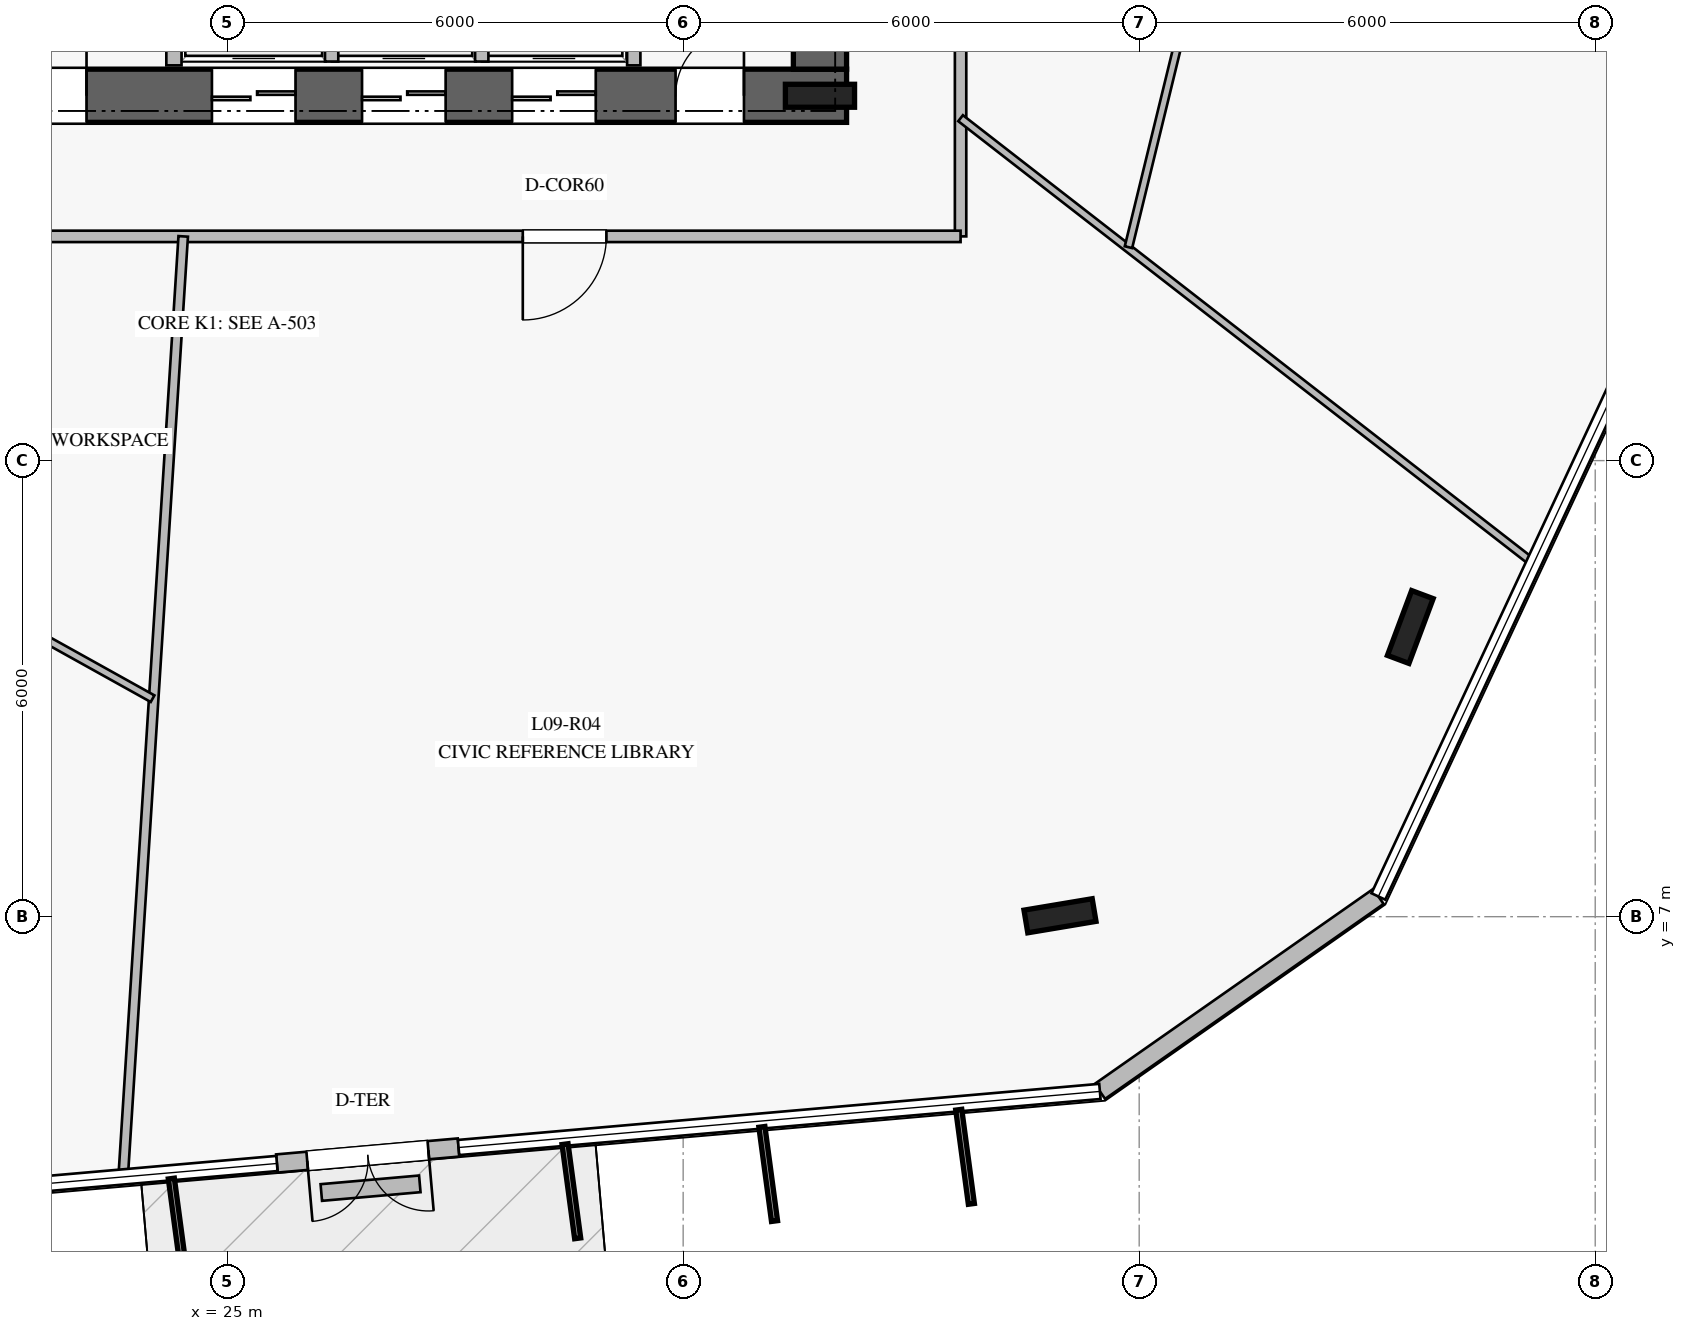
"""IFC4 building model, lengths in metres.
Left out: names, types, materials, properties, quantities, classifications, styles, units other than length and angle.
Written with IfcOpenShell. Run it as: python <this file> out.ifc"""

import sys

from ifc_helpers import new_model, si_unit, direction, frame, frame_2d, origin, origin_2d, place, context, subcontext, project, spatial, rectangle, i_section, extrude, element, fill, save


model = new_model("IFC4")
c1 = context("Model", 3, precision=1e-05, world=origin(), true_north=direction((0.0, 1.0)))
c2 = subcontext(c1, "Body", "Model", "MODEL_VIEW")
j1 = project(units=[si_unit("LENGTHUNIT", "METRE"), si_unit("PLANEANGLEUNIT", "RADIAN")], contexts=[c1])
p1 = place(None, origin())
s1 = spatial("IfcSite", under=j1, at=p1, CompositionType="ELEMENT")
p2 = place(p1, origin())
s2 = spatial("IfcBuilding", under=s1, at=p2, CompositionType="ELEMENT")
p3 = place(p2, frame((0.0, 0.0, 40.0)))
s3 = spatial("IfcBuildingStorey", under=s2, at=p3, CompositionType="ELEMENT", Elevation=40.0)
p4 = place(p3, frame((16.85, 17.8, 0.0), z_axis=(0.0, 0.0, 1.0), x_axis=(1.0, 0.0, 0.0)))
e1 = element("IfcWall", 1, at=p4, inside=s3, PredefinedType="SHEAR", context=c2, shape_type="SweptSolid", body=[
    extrude(rectangle(XDim=16.3, YDim=0.7, at=frame_2d((8.15, 0.0))), origin(), (0.0, 0.0, 1.0), 3.76),
])
p5 = place(p4, frame((5.1, 0.0, 0.0)))
e2 = element("IfcOpeningElement", 2, at=p5, cuts=e1, PredefinedType="OPENING", context=c2, shape_type="SweptSolid", body=[
    extrude(rectangle(XDim=1.2, YDim=2.25, at=frame_2d((0.6, 1.125))), frame((0.0, 0.36, 0.0), z_axis=(0.0, -1.0, 0.0), x_axis=(1.0, 0.0, 0.0)), (0.0, 0.0, 1.0), 0.72),
])
p6 = place(p4, frame((14.05, 0.0, 0.0)))
e3 = element("IfcOpeningElement", 3, at=p6, cuts=e1, PredefinedType="OPENING", context=c2, shape_type="SweptSolid", body=[
    extrude(rectangle(XDim=0.9, YDim=2.1, at=frame_2d((0.45, 1.05))), frame((0.0, 0.36, 0.0), z_axis=(0.0, -1.0, 0.0), x_axis=(1.0, 0.0, 0.0)), (0.0, 0.0, 1.0), 0.72),
])
p7 = place(p4, frame((7.95, 0.0, 0.0)))
e4 = element("IfcOpeningElement", 4, at=p7, cuts=e1, PredefinedType="OPENING", context=c2, shape_type="SweptSolid", body=[
    extrude(rectangle(XDim=1.1, YDim=2.2, at=frame_2d((0.55, 1.1))), frame((0.0, 0.36, 0.0), z_axis=(0.0, -1.0, 0.0), x_axis=(1.0, 0.0, 0.0)), (0.0, 0.0, 1.0), 0.72),
])
p8 = place(p4, frame((9.925, 0.0, 0.0)))
e5 = element("IfcOpeningElement", 5, at=p8, cuts=e1, PredefinedType="OPENING", context=c2, shape_type="SweptSolid", body=[
    extrude(rectangle(XDim=1.1, YDim=2.2, at=frame_2d((0.55, 1.1))), frame((0.0, 0.36, 0.0), z_axis=(0.0, -1.0, 0.0), x_axis=(1.0, 0.0, 0.0)), (0.0, 0.0, 1.0), 0.72),
])
p9 = place(p4, frame((11.9, 0.0, 0.0)))
e6 = element("IfcOpeningElement", 6, at=p9, cuts=e1, PredefinedType="OPENING", context=c2, shape_type="SweptSolid", body=[
    extrude(rectangle(XDim=1.1, YDim=2.2, at=frame_2d((0.55, 1.1))), frame((0.0, 0.36, 0.0), z_axis=(0.0, -1.0, 0.0), x_axis=(1.0, 0.0, 0.0)), (0.0, 0.0, 1.0), 0.72),
])
p10 = place(p3, frame((32.8, 18.15, 0.0), z_axis=(0.0, 0.0, 1.0), x_axis=(0.0, 1.0, 0.0)))
e7 = element("IfcWall", 7, at=p10, inside=s3, PredefinedType="SHEAR", context=c2, shape_type="SweptSolid", body=[
    extrude(rectangle(XDim=13.7, YDim=0.7, at=frame_2d((6.85, 0.0))), origin(), (0.0, 0.0, 1.0), 3.76),
])
for number, where, z_axis, x_axis in (
    (8, (32.8, 17.8, 0.0), (0.0, 0.0, 1.0), (1.0, 0.0, 0.0)),
    (9, (35.958, 7.012, 0.0), (0.0, 0.0, 1.0), (0.986, 0.165, 0.0)),
    (10, (40.567, 10.811, 0.0), (0.0, 0.0, 1.0), (0.35, 0.937, 0.0)),
):
    element("IfcColumn", number, at=place(p3, frame(where, z_axis=z_axis, x_axis=x_axis)), inside=s3, PredefinedType="COLUMN", context=c2, shape_type="SweptSolid", body=[
        extrude(i_section(OverallWidth=0.302, OverallDepth=0.91, WebThickness=0.021, FlangeThickness=0.04, at=origin_2d()), origin(), (0.0, 0.0, 1.0), 4.0),
    ])
p11 = place(p3, frame((25.655, 3.753, 0.0), z_axis=(0.0, 0.0, 1.0), x_axis=(0.996163059217, 0.087516623856, 0.0)))
e11 = element("IfcWall", 11, at=p11, inside=s3, PredefinedType="STANDARD", context=c2, shape_type="SweptSolid", body=[
    extrude(rectangle(XDim=2.399, YDim=0.24, at=frame_2d((1.2, 0.0))), origin(), (0.0, 0.0, 1.0), 3.76),
])
p12 = place(p11, frame((0.4, 0.0, 0.0)))
e12 = element("IfcOpeningElement", 12, at=p12, cuts=e11, PredefinedType="OPENING", context=c2, shape_type="SweptSolid", body=[
    extrude(rectangle(XDim=1.6, YDim=2.25, at=frame_2d((0.8, 1.125))), frame((0.0, 0.13, 0.0), z_axis=(0.0, -1.0, 0.0), x_axis=(1.0, 0.0, 0.0)), (0.0, 0.0, 1.0), 0.26),
])
p13 = place(p3, frame((36.483, 4.701, 0.0), z_axis=(0.0, 0.0, 1.0), x_axis=(0.819196018056, 0.573513630178, 0.0)))
e13 = element("IfcWall", 13, at=p13, inside=s3, PredefinedType="STANDARD", context=c2, shape_type="SweptSolid", body=[
    extrude(rectangle(XDim=4.473, YDim=0.24, at=frame_2d((2.236, 0.0))), origin(), (0.0, 0.0, 1.0), 3.76),
])
p14 = place(p3, frame((26.239, 3.371, 0.0), z_axis=(0.0, 0.0, 1.0), x_axis=(0.996152048595, 0.087641862602, 0.0)))
e14 = element("IfcWall", 14, at=p14, inside=s3, PredefinedType="USERDEFINED", context=c2, shape_type="SweptSolid", body=[
    extrude(rectangle(XDim=1.301, YDim=0.22, at=frame_2d((0.65, 0.0))), origin(), (0.0, 0.0, 1.0), 0.4),
])
p15 = place(p3, frame((24.3, 18.2, 0.0), z_axis=(0.0, 0.0, 1.0), x_axis=(0.0, 1.0, 0.0)))
e15 = element("IfcWall", 15, at=p15, inside=s3, PredefinedType="PARTITIONING", context=c2, shape_type="SweptSolid", body=[
    extrude(rectangle(XDim=5.15, YDim=0.2, at=frame_2d((2.575, 0.0))), origin(), (0.0, 0.0, 1.0), 3.76),
])
p16 = place(p3, frame((30.35, 18.2, 0.0), z_axis=(0.0, 0.0, 1.0), x_axis=(0.0, 1.0, 0.0)))
e16 = element("IfcWall", 16, at=p16, inside=s3, PredefinedType="PARTITIONING", context=c2, shape_type="SweptSolid", body=[
    extrude(rectangle(XDim=3.48, YDim=0.175, at=frame_2d((1.74, 0.0))), origin(), (0.0, 0.0, 1.0), 3.76),
])
for number, where, z_axis, x_axis in (
    (17, (26.375, 18.25, 0.0), (0.0, 0.0, 1.0), (0.0, 1.0, 0.0)),
    (18, (28.35, 18.25, 0.0), (0.0, 0.0, 1.0), (0.0, 1.0, 0.0)),
):
    element("IfcWall", number, at=place(p3, frame(where, z_axis=z_axis, x_axis=x_axis)), inside=s3, PredefinedType="PARTITIONING", context=c2, shape_type="SweptSolid", body=[
        extrude(rectangle(XDim=2.35, YDim=0.175, at=frame_2d((1.175, 0.0))), origin(), (0.0, 0.0, 1.0), 3.76),
    ])
p17 = place(p3, frame((34.65, 34.05, 0.0), z_axis=(0.0, 0.0, 1.0), x_axis=(0.0, -1.0, 0.0)))
e19 = element("IfcWall", 19, at=p17, inside=s3, PredefinedType="PARTITIONING", context=c2, shape_type="SweptSolid", body=[
    extrude(rectangle(XDim=18.1, YDim=0.15, at=frame_2d((9.05, 0.0))), origin(), (0.0, 0.0, 1.0), 3.21),
])
p18 = place(p17, frame((11.291, 0.0, 0.0)))
e20 = element("IfcOpeningElement", 20, at=p18, cuts=e19, PredefinedType="OPENING", context=c2, shape_type="SweptSolid", body=[
    extrude(rectangle(XDim=1.1, YDim=2.2, at=frame_2d((0.55, 1.1))), frame((0.0, 0.085, 0.0), z_axis=(0.0, -1.0, 0.0), x_axis=(1.0, 0.0, 0.0)), (0.0, 0.0, 1.0), 0.17),
])
p19 = place(p17, frame((3.169, 0.0, 0.0)))
e21 = element("IfcOpeningElement", 21, at=p19, cuts=e19, PredefinedType="OPENING", context=c2, shape_type="SweptSolid", body=[
    extrude(rectangle(XDim=1.1, YDim=2.2, at=frame_2d((0.55, 1.1))), frame((0.0, 0.085, 0.0), z_axis=(0.0, -1.0, 0.0), x_axis=(1.0, 0.0, 0.0)), (0.0, 0.0, 1.0), 0.17),
])
p20 = place(p3, frame((34.65, 15.95, 0.0), z_axis=(0.0, 0.0, 1.0), x_axis=(-1.0, 0.0, 0.0)))
e22 = element("IfcWall", 22, at=p20, inside=s3, PredefinedType="PARTITIONING", context=c2, shape_type="SweptSolid", body=[
    extrude(rectangle(XDim=19.3, YDim=0.15, at=frame_2d((9.65, 0.0))), origin(), (0.0, 0.0, 1.0), 3.21),
])
p21 = place(p20, frame((14.122, 0.0, 0.0)))
e23 = element("IfcOpeningElement", 23, at=p21, cuts=e22, PredefinedType="OPENING", context=c2, shape_type="SweptSolid", body=[
    extrude(rectangle(XDim=1.1, YDim=2.2, at=frame_2d((0.55, 1.1))), frame((0.0, 0.085, 0.0), z_axis=(0.0, -1.0, 0.0), x_axis=(1.0, 0.0, 0.0)), (0.0, 0.0, 1.0), 0.17),
])
p22 = place(p20, frame((4.66, 0.0, 0.0)))
e24 = element("IfcOpeningElement", 24, at=p22, cuts=e22, PredefinedType="OPENING", context=c2, shape_type="SweptSolid", body=[
    extrude(rectangle(XDim=1.1, YDim=2.2, at=frame_2d((0.55, 1.1))), frame((0.0, 0.085, 0.0), z_axis=(0.0, -1.0, 0.0), x_axis=(1.0, 0.0, 0.0)), (0.0, 0.0, 1.0), 0.17),
])
p23 = place(p3, frame((24.422, 15.95, 0.0), z_axis=(0.0, 0.0, 1.0), x_axis=(-0.063731074796, -0.997967108729, 0.0)))
e25 = element("IfcWall", 25, at=p23, inside=s3, PredefinedType="PARTITIONING", context=c2, shape_type="SweptSolid", body=[
    extrude(rectangle(XDim=12.381, YDim=0.125, at=frame_2d((6.19, 0.0))), origin(), (0.0, 0.0, 1.0), 3.02),
])
p24 = place(p3, frame((34.65, 17.505, 0.0), z_axis=(0.0, 0.0, 1.0), x_axis=(0.789793468824, -0.613372869145, 0.0)))
e26 = element("IfcWall", 26, at=p24, inside=s3, PredefinedType="MOVABLE", context=c2, shape_type="SweptSolid", body=[
    extrude(rectangle(XDim=9.529, YDim=0.1, at=frame_2d((4.765, 0.0))), origin(), (0.0, 0.0, 1.0), 3.06),
])
p25 = place(p3, frame((10.108, 17.608, 0.0), z_axis=(0.0, 0.0, 1.0), x_axis=(0.873848208076, -0.486198837147, 0.0)))
e27 = element("IfcWall", 27, at=p25, inside=s3, PredefinedType="MOVABLE", context=c2, shape_type="SweptSolid", body=[
    extrude(rectangle(XDim=15.919, YDim=0.1, at=frame_2d((7.96, 0.0))), origin(), (0.0, 0.0, 1.0), 3.02),
])
p26 = place(p25, frame((7.46, 0.0, 0.0)))
e28 = element("IfcOpeningElement", 28, at=p26, cuts=e27, PredefinedType="OPENING", context=c2, shape_type="SweptSolid", body=[
    extrude(rectangle(XDim=1.0, YDim=2.15, at=frame_2d((0.5, 1.075))), frame((0.0, 0.06, 0.0), z_axis=(0.0, -1.0, 0.0), x_axis=(1.0, 0.0, 0.0)), (0.0, 0.0, 1.0), 0.12),
])
p27 = place(p3, frame((36.859, 15.808, 0.0), z_axis=(0.0, 0.0, 1.0), x_axis=(0.237065253886, 0.971493728955, 0.0)))
e29 = element("IfcWall", 29, at=p27, inside=s3, PredefinedType="MOVABLE", context=c2, shape_type="SweptSolid", body=[
    extrude(rectangle(XDim=12.263, YDim=0.1, at=frame_2d((6.132, 0.0))), origin(), (0.0, 0.0, 1.0), 3.76),
])
p28 = place(p27, frame((5.542, 0.0, 0.0)))
e30 = element("IfcOpeningElement", 30, at=p28, cuts=e29, PredefinedType="OPENING", context=c2, shape_type="SweptSolid", body=[
    extrude(rectangle(XDim=1.0, YDim=2.15, at=frame_2d((0.5, 1.075))), frame((0.0, 0.06, 0.0), z_axis=(0.0, -1.0, 0.0), x_axis=(1.0, 0.0, 0.0)), (0.0, 0.0, 1.0), 0.12),
])
p29 = place(p12, frame((1.6, 0.0, 0.0), z_axis=(0.0, 0.0, 1.0), x_axis=(-1.0, 0.0, 0.0)))
e31 = element("IfcDoor", 31, at=p29, inside=s3, OperationType="DOUBLE_DOOR_SINGLE_SWING", PredefinedType="DOOR", context=c2, shape_type="SweptSolid", body=[
    extrude(rectangle(XDim=1.6, YDim=2.25, at=frame_2d((0.8, 1.125))), frame((0.0, 0.025, 0.0), z_axis=(0.0, -1.0, 0.0), x_axis=(1.0, 0.0, 0.0)), (0.0, 0.0, 1.0), 0.05),
])
fill(e12, e31)
p30 = place(p5, origin())
e32 = element("IfcDoor", 32, at=p30, inside=s3, OperationType="SINGLE_SWING_RIGHT", PredefinedType="DOOR", context=c2, shape_type="SweptSolid", body=[
    extrude(rectangle(XDim=1.2, YDim=2.25, at=frame_2d((0.6, 1.125))), frame((0.0, 0.025, 0.0), z_axis=(0.0, -1.0, 0.0), x_axis=(1.0, 0.0, 0.0)), (0.0, 0.0, 1.0), 0.05),
])
fill(e2, e32)
p31 = place(p6, origin())
e33 = element("IfcDoor", 33, at=p31, inside=s3, OperationType="SINGLE_SWING_RIGHT", PredefinedType="DOOR", context=c2, shape_type="SweptSolid", body=[
    extrude(rectangle(XDim=0.9, YDim=2.1, at=frame_2d((0.45, 1.05))), frame((0.0, 0.025, 0.0), z_axis=(0.0, -1.0, 0.0), x_axis=(1.0, 0.0, 0.0)), (0.0, 0.0, 1.0), 0.05),
])
fill(e3, e33)
p32 = place(p7, origin())
e34 = element("IfcDoor", 34, at=p32, inside=s3, OperationType="DOUBLE_DOOR_SLIDING", PredefinedType="DOOR", context=c2, shape_type="SweptSolid", body=[
    extrude(rectangle(XDim=1.1, YDim=2.2, at=frame_2d((0.55, 1.1))), frame((0.0, 0.025, 0.0), z_axis=(0.0, -1.0, 0.0), x_axis=(1.0, 0.0, 0.0)), (0.0, 0.0, 1.0), 0.05),
])
fill(e4, e34)
p33 = place(p8, origin())
e35 = element("IfcDoor", 35, at=p33, inside=s3, OperationType="DOUBLE_DOOR_SLIDING", PredefinedType="DOOR", context=c2, shape_type="SweptSolid", body=[
    extrude(rectangle(XDim=1.1, YDim=2.2, at=frame_2d((0.55, 1.1))), frame((0.0, 0.025, 0.0), z_axis=(0.0, -1.0, 0.0), x_axis=(1.0, 0.0, 0.0)), (0.0, 0.0, 1.0), 0.05),
])
fill(e5, e35)
p34 = place(p9, origin())
e36 = element("IfcDoor", 36, at=p34, inside=s3, OperationType="DOUBLE_DOOR_SLIDING", PredefinedType="DOOR", context=c2, shape_type="SweptSolid", body=[
    extrude(rectangle(XDim=1.1, YDim=2.2, at=frame_2d((0.55, 1.1))), frame((0.0, 0.025, 0.0), z_axis=(0.0, -1.0, 0.0), x_axis=(1.0, 0.0, 0.0)), (0.0, 0.0, 1.0), 0.05),
])
fill(e6, e36)
p35 = place(p22, origin())
e37 = element("IfcDoor", 37, at=p35, inside=s3, OperationType="SINGLE_SWING_RIGHT", PredefinedType="DOOR", context=c2, shape_type="SweptSolid", body=[
    extrude(rectangle(XDim=1.1, YDim=2.2, at=frame_2d((0.55, 1.1))), frame((0.0, 0.025, 0.0), z_axis=(0.0, -1.0, 0.0), x_axis=(1.0, 0.0, 0.0)), (0.0, 0.0, 1.0), 0.05),
])
fill(e24, e37)
save(model, sys.argv[1])
